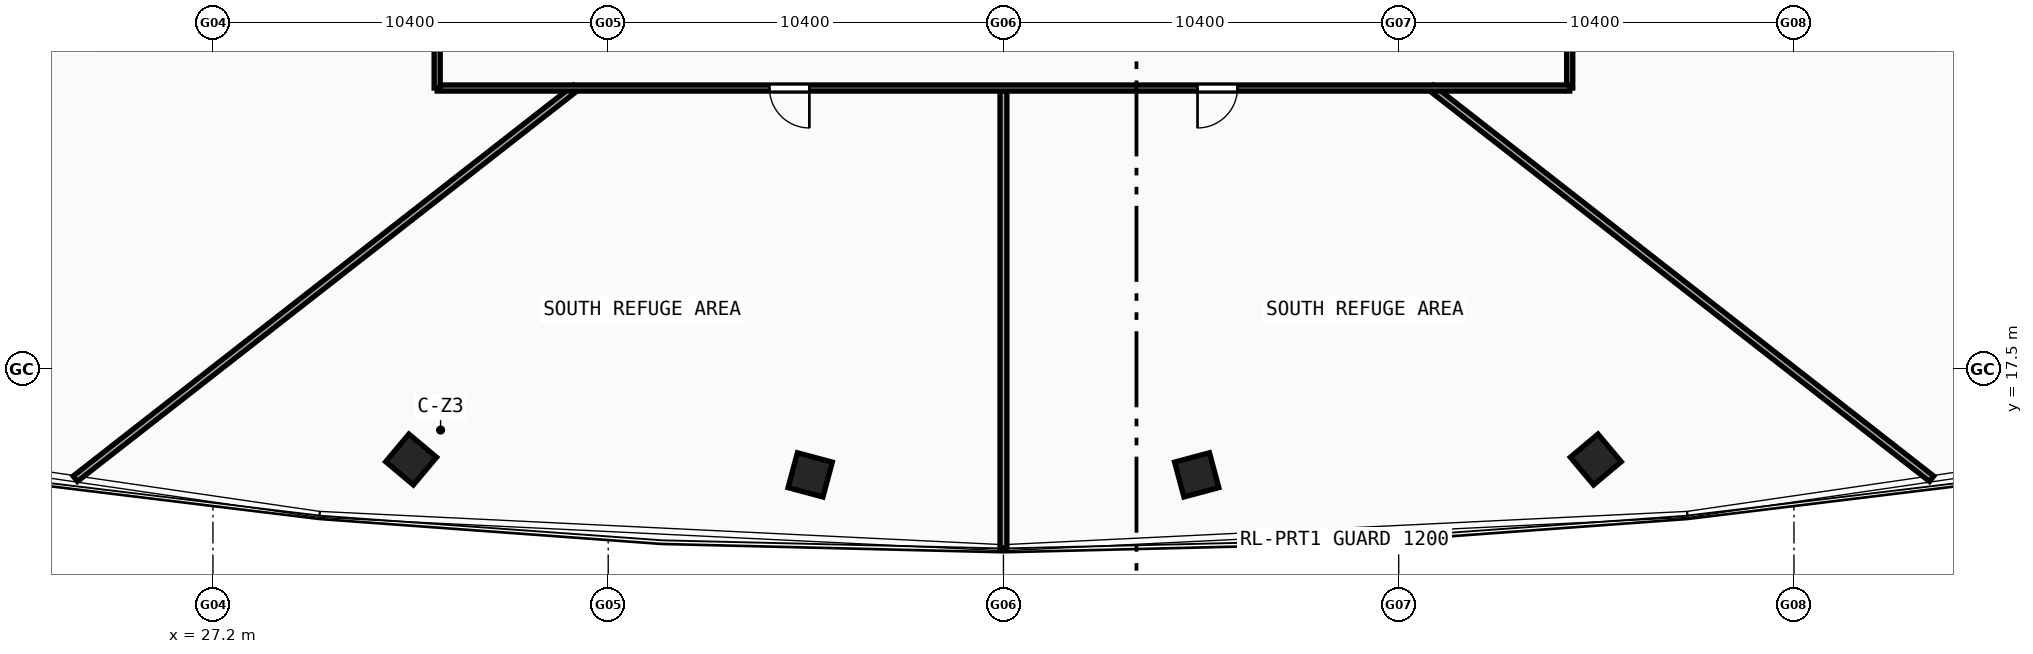
"""IFC4 building model, lengths in metres.
Left out: names, types, materials, properties, quantities, classifications, styles, units other than length and angle.
Written with IfcOpenShell. Run it as: python <this file> out.ifc"""

import sys

from ifc_helpers import new_model, si_unit, direction, frame, frame_2d, origin, origin_with_axes, origin_2d, place, context, subcontext, project, spatial, rectangle, hollow_rectangle, extrude, source, transform, mapped, element, fill, save


model = new_model("IFC4")
c1 = context("Model", 3, precision=1e-05, world=origin(), true_north=direction((0.0, 1.0)))
c2 = subcontext(c1, "Body", "Model", "MODEL_VIEW")
j1 = project(units=[si_unit("LENGTHUNIT", "METRE"), si_unit("PLANEANGLEUNIT", "RADIAN")], contexts=[c1])
p1 = place(None, origin())
s1 = spatial("IfcSite", under=j1, at=p1, CompositionType="ELEMENT")
p2 = place(p1, origin())
s2 = spatial("IfcBuilding", under=s1, at=p2, CompositionType="ELEMENT")
p3 = place(p2, frame((0.0, 0.0, 125.03)))
s3 = spatial("IfcBuildingStorey", under=s2, at=p3, CompositionType="ELEMENT", Elevation=125.03)
m1 = source(origin(), c2, "Body", "SweptSolid", [
    extrude(hollow_rectangle(XDim=0.95, YDim=0.95, WallThickness=0.04, at=origin_2d()), origin(), (0.0, 0.0, 1.0), 4.82),
])
for number, where, z_axis, x_axis in (
    (1, (32.415, 15.126, -0.28), (0.0, 0.0, 1.0), (0.766, -0.643, 0.0)),
    (2, (42.915, 14.722, -0.28), (0.0, 0.0, 1.0), (0.966, -0.259, 0.0)),
    (3, (53.085, 14.722, -0.28), (0.0, 0.0, 1.0), (0.966, 0.259, 0.0)),
    (4, (63.585, 15.126, -0.28), (0.0, 0.0, 1.0), (0.766, 0.643, 0.0)),
):
    element("IfcColumn", number, at=place(p3, frame(where, z_axis=z_axis, x_axis=x_axis)), inside=s3, PredefinedType="COLUMN", context=c2, shape_type="MappedRepresentation", body=[
        mapped(m1, transform((0.0, 0.0, 0.0), scale=1.0)),
    ])
p4 = place(p3, frame((36.737, 24.9, 0.0), z_axis=(0.0, 0.0, 1.0), x_axis=(-0.788012847889, -0.615658794758, 0.0)))
e5 = element("IfcWall", 5, at=p4, inside=s3, PredefinedType="PARTITIONING", context=c2, shape_type="SweptSolid", body=[
    extrude(rectangle(XDim=16.699, YDim=0.18, at=frame_2d((8.35, 0.0))), origin(), (0.0, 0.0, 1.0), 3.89),
])
p5 = place(p3, frame((48.0, 24.9, 0.0), z_axis=(0.0, 0.0, 1.0), x_axis=(0.0, -1.0, 0.0)))
e6 = element("IfcWall", 6, at=p5, inside=s3, PredefinedType="PARTITIONING", context=c2, shape_type="SweptSolid", body=[
    extrude(rectangle(XDim=12.095, YDim=0.18, at=frame_2d((6.047, 0.0))), origin(), (0.0, 0.0, 1.0), 3.89),
])
p6 = place(p3, frame((59.263, 24.9, 0.0), z_axis=(0.0, 0.0, 1.0), x_axis=(0.788012847889, -0.615658794758, 0.0)))
e7 = element("IfcWall", 7, at=p6, inside=s3, PredefinedType="PARTITIONING", context=c2, shape_type="SweptSolid", body=[
    extrude(rectangle(XDim=16.699, YDim=0.18, at=frame_2d((8.35, 0.0))), origin(), (0.0, 0.0, 1.0), 3.89),
])
p7 = place(p3, frame((62.9, 42.9, 0.0), z_axis=(0.0, 0.0, 1.0), x_axis=(0.0, -1.0, 0.0)))
e8 = element("IfcWall", 8, at=p7, inside=s3, PredefinedType="PARTITIONING", context=c2, shape_type="SweptSolid", body=[
    extrude(rectangle(XDim=18.0, YDim=0.16, at=frame_2d((9.0, 0.0))), origin(), (0.0, 0.0, 1.0), 3.89),
])
p8 = place(p7, frame((12.328, 0.0, 0.0)))
e9 = element("IfcOpeningElement", 9, at=p8, cuts=e8, PredefinedType="OPENING", context=c2, shape_type="SweptSolid", body=[
    extrude(rectangle(XDim=1.05, YDim=2.1, at=frame_2d((0.525, 1.05))), frame((0.0, 0.09, 0.0), z_axis=(0.0, -1.0, 0.0), x_axis=(1.0, 0.0, 0.0)), (0.0, 0.0, 1.0), 0.18),
])
p9 = place(p3, frame((62.9, 24.9, 0.0), z_axis=(0.0, 0.0, 1.0), x_axis=(-1.0, 0.0, 0.0)))
e10 = element("IfcWall", 10, at=p9, inside=s3, PredefinedType="PARTITIONING", context=c2, shape_type="SweptSolid", body=[
    extrude(rectangle(XDim=29.8, YDim=0.16, at=frame_2d((14.9, 0.0))), origin(), (0.0, 0.0, 1.0), 3.89),
])
p10 = place(p9, frame((20.007, 0.0, 0.0)))
e11 = element("IfcOpeningElement", 11, at=p10, cuts=e10, PredefinedType="OPENING", context=c2, shape_type="SweptSolid", body=[
    extrude(rectangle(XDim=1.05, YDim=2.1, at=frame_2d((0.525, 1.05))), frame((0.0, 0.09, 0.0), z_axis=(0.0, -1.0, 0.0), x_axis=(1.0, 0.0, 0.0)), (0.0, 0.0, 1.0), 0.18),
])
p11 = place(p9, frame((8.743, 0.0, 0.0)))
e12 = element("IfcOpeningElement", 12, at=p11, cuts=e10, PredefinedType="OPENING", context=c2, shape_type="SweptSolid", body=[
    extrude(rectangle(XDim=1.05, YDim=2.1, at=frame_2d((0.525, 1.05))), frame((0.0, 0.09, 0.0), z_axis=(0.0, -1.0, 0.0), x_axis=(1.0, 0.0, 0.0)), (0.0, 0.0, 1.0), 0.18),
])
p12 = place(p3, frame((33.1, 24.9, 0.0), z_axis=(0.0, 0.0, 1.0), x_axis=(0.0, 1.0, 0.0)))
e13 = element("IfcWall", 13, at=p12, inside=s3, PredefinedType="PARTITIONING", context=c2, shape_type="SweptSolid", body=[
    extrude(rectangle(XDim=18.0, YDim=0.16, at=frame_2d((9.0, 0.0))), origin(), (0.0, 0.0, 1.0), 3.89),
])
p13 = place(p12, frame((4.622, 0.0, 0.0)))
e14 = element("IfcOpeningElement", 14, at=p13, cuts=e13, PredefinedType="OPENING", context=c2, shape_type="SweptSolid", body=[
    extrude(rectangle(XDim=1.05, YDim=2.1, at=frame_2d((0.525, 1.05))), frame((0.0, 0.09, 0.0), z_axis=(0.0, -1.0, 0.0), x_axis=(1.0, 0.0, 0.0)), (0.0, 0.0, 1.0), 0.18),
])
m2 = source(origin(), c2, "Body", "SweptSolid", [
    extrude(rectangle(XDim=1.05, YDim=2.1, at=frame_2d((0.525, 1.05))), frame((0.0, 0.025, 0.0), z_axis=(0.0, -1.0, 0.0), x_axis=(1.0, 0.0, 0.0)), (0.0, 0.0, 1.0), 0.05),
])
p14 = place(p10, origin_with_axes())
e15 = element("IfcDoor", 15, at=p14, inside=s3, OperationType="SINGLE_SWING_LEFT", PredefinedType="DOOR", context=c2, shape_type="MappedRepresentation", body=[
    mapped(m2, transform((0.0, 0.0, 0.0), scale=1.0)),
])
fill(e11, e15)
p15 = place(p11, origin_with_axes())
e16 = element("IfcDoor", 16, at=p15, inside=s3, OperationType="SINGLE_SWING_RIGHT", PredefinedType="DOOR", context=c2, shape_type="MappedRepresentation", body=[
    mapped(m2, transform((0.0, 0.0, 0.0), scale=1.0)),
])
fill(e12, e16)
save(model, sys.argv[1])
